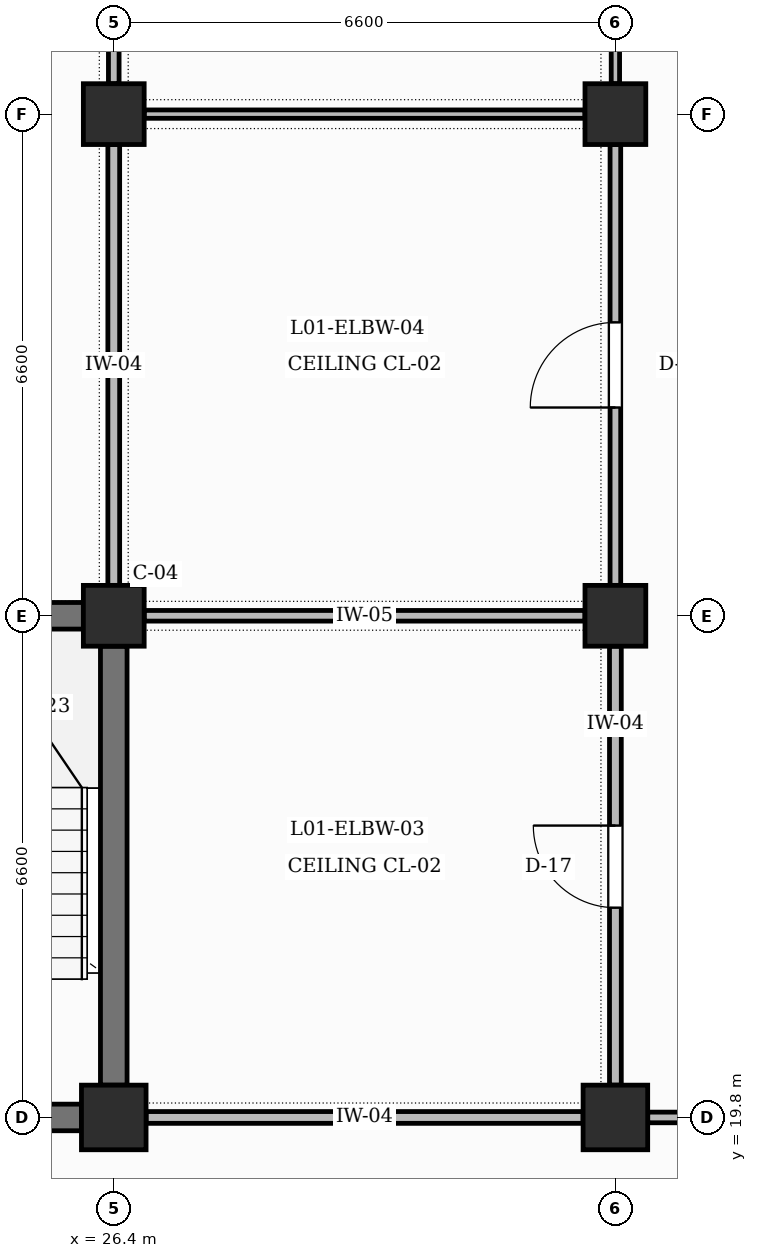
"""IFC4 building model, lengths in metres.
Left out: names, types, materials, properties, quantities, classifications, styles, units other than length and angle.
Written with IfcOpenShell. Run it as: python <this file> out.ifc"""

import sys

from ifc_helpers import new_model, si_unit, direction, frame, frame_2d, origin, origin_2d, place, context, subcontext, project, spatial, rectangle, extrude, element, fill, save


model = new_model("IFC4")
c1 = context("Model", 3, precision=1e-05, world=origin(), true_north=direction((0.0, 1.0)))
c2 = subcontext(c1, "Body", "Model", "MODEL_VIEW")
j1 = project(units=[si_unit("LENGTHUNIT", "METRE"), si_unit("PLANEANGLEUNIT", "RADIAN")], contexts=[c1])
p1 = place(None, origin())
s1 = spatial("IfcSite", under=j1, at=p1, CompositionType="ELEMENT")
p2 = place(p1, origin())
s2 = spatial("IfcBuilding", under=s1, at=p2, CompositionType="ELEMENT")
p3 = place(p2, frame((0.0, 0.0, 5.4)))
s3 = spatial("IfcBuildingStorey", under=s2, at=p3, CompositionType="ELEMENT", Elevation=5.4)
p4 = place(p3, frame((26.4, 19.8, 0.0), z_axis=(0.0, 0.0, 1.0), x_axis=(1.0, 0.0, 0.0)))
e1 = element("IfcColumn", 1, at=p4, inside=s3, PredefinedType="COLUMN", context=c2, shape_type="SweptSolid", body=[
    extrude(rectangle(XDim=0.85, YDim=0.85, at=origin_2d()), origin(), (0.0, 0.0, 1.0), 4.8),
])
for number, where, z_axis, x_axis in (
    (2, (26.4, 26.4, 0.0), (0.0, 0.0, 1.0), (1.0, 0.0, 0.0)),
    (3, (26.4, 33.0, 0.0), (0.0, 0.0, 1.0), (1.0, 0.0, 0.0)),
):
    element("IfcColumn", number, at=place(p3, frame(where, z_axis=z_axis, x_axis=x_axis)), inside=s3, PredefinedType="COLUMN", context=c2, shape_type="SweptSolid", body=[
        extrude(rectangle(XDim=0.8, YDim=0.8, at=origin_2d()), origin(), (0.0, 0.0, 1.0), 4.8),
    ])
p5 = place(p3, frame((33.0, 19.8, 0.0), z_axis=(0.0, 0.0, 1.0), x_axis=(1.0, 0.0, 0.0)))
e4 = element("IfcColumn", 4, at=p5, inside=s3, PredefinedType="COLUMN", context=c2, shape_type="SweptSolid", body=[
    extrude(rectangle(XDim=0.85, YDim=0.85, at=origin_2d()), origin(), (0.0, 0.0, 1.0), 4.8),
])
for number, where, z_axis, x_axis in (
    (5, (33.0, 26.4, 0.0), (0.0, 0.0, 1.0), (1.0, 0.0, 0.0)),
    (6, (33.0, 33.0, 0.0), (0.0, 0.0, 1.0), (1.0, 0.0, 0.0)),
):
    element("IfcColumn", number, at=place(p3, frame(where, z_axis=z_axis, x_axis=x_axis)), inside=s3, PredefinedType="COLUMN", context=c2, shape_type="SweptSolid", body=[
        extrude(rectangle(XDim=0.8, YDim=0.8, at=origin_2d()), origin(), (0.0, 0.0, 1.0), 4.8),
    ])
p6 = place(p3, frame((20.225, 19.8, 0.0), z_axis=(0.0, 0.0, 1.0), x_axis=(1.0, 0.0, 0.0)))
e7 = element("IfcWall", 7, at=p6, inside=s3, PredefinedType="SHEAR", context=c2, shape_type="SweptSolid", body=[
    extrude(rectangle(XDim=5.75, YDim=0.35, at=frame_2d((2.875, 0.0))), origin(), (0.0, 0.0, 1.0), 3.6),
])
p7 = place(p6, frame((2.325, 0.0, 0.0)))
e8 = element("IfcOpeningElement", 8, at=p7, cuts=e7, PredefinedType="OPENING", context=c2, shape_type="SweptSolid", body=[
    extrude(rectangle(XDim=1.1, YDim=2.15, at=frame_2d((0.55, 1.075))), frame((0.0, 0.185, 0.0), z_axis=(0.0, -1.0, 0.0), x_axis=(1.0, 0.0, 0.0)), (0.0, 0.0, 1.0), 0.37),
])
for number, where, z_axis, x_axis in (
    (9, (20.225, 26.4, 0.0), (0.0, 0.0, 1.0), (1.0, 0.0, 0.0)),
    (10, (26.4, 20.225, 0.0), (0.0, 0.0, 1.0), (0.0, 1.0, 0.0)),
):
    element("IfcWall", number, at=place(p3, frame(where, z_axis=z_axis, x_axis=x_axis)), inside=s3, PredefinedType="SHEAR", context=c2, shape_type="SweptSolid", body=[
        extrude(rectangle(XDim=5.775, YDim=0.35, at=frame_2d((2.887, 0.0))), origin(), (0.0, 0.0, 1.0), 3.7),
    ])
p8 = place(p3, frame((26.4, 26.8, 0.0), z_axis=(0.0, 0.0, 1.0), x_axis=(0.0, 1.0, 0.0)))
e11 = element("IfcWall", 11, at=p8, inside=s3, PredefinedType="PARTITIONING", context=c2, shape_type="SweptSolid", body=[
    extrude(rectangle(XDim=5.8, YDim=0.155, at=frame_2d((2.9, 0.0))), origin(), (0.0, 0.0, 1.0), 3.7),
])
p9 = place(p3, frame((26.4, 33.4, 0.0), z_axis=(0.0, 0.0, 1.0), x_axis=(0.0, 1.0, 0.0)))
e12 = element("IfcWall", 12, at=p9, inside=s3, PredefinedType="PARTITIONING", context=c2, shape_type="SweptSolid", body=[
    extrude(rectangle(XDim=5.8, YDim=0.14, at=frame_2d((2.9, 0.0))), origin(), (0.0, 0.0, 1.0), 3.7),
])
p10 = place(p3, frame((26.825, 19.8, 0.0), z_axis=(0.0, 0.0, 1.0), x_axis=(1.0, 0.0, 0.0)))
e13 = element("IfcWall", 13, at=p10, inside=s3, PredefinedType="PARTITIONING", context=c2, shape_type="SweptSolid", body=[
    extrude(rectangle(XDim=5.75, YDim=0.155, at=frame_2d((2.875, 0.0))), origin(), (0.0, 0.0, 1.0), 3.7),
])
p11 = place(p3, frame((33.0, 20.225, 0.0), z_axis=(0.0, 0.0, 1.0), x_axis=(0.0, 1.0, 0.0)))
e14 = element("IfcWall", 14, at=p11, inside=s3, PredefinedType="PARTITIONING", context=c2, shape_type="SweptSolid", body=[
    extrude(rectangle(XDim=5.775, YDim=0.155, at=frame_2d((2.887, 0.0))), origin(), (0.0, 0.0, 1.0), 3.7),
])
p12 = place(p11, frame((2.335, 0.0, 0.0)))
e15 = element("IfcOpeningElement", 15, at=p12, cuts=e14, PredefinedType="OPENING", context=c2, shape_type="SweptSolid", body=[
    extrude(rectangle(XDim=1.08, YDim=2.15, at=frame_2d((0.54, 1.075))), frame((0.0, 0.087, 0.0), z_axis=(0.0, -1.0, 0.0), x_axis=(1.0, 0.0, 0.0)), (0.0, 0.0, 1.0), 0.175),
])
p13 = place(p3, frame((26.8, 26.4, 0.0), z_axis=(0.0, 0.0, 1.0), x_axis=(1.0, 0.0, 0.0)))
e16 = element("IfcWall", 16, at=p13, inside=s3, PredefinedType="PARTITIONING", context=c2, shape_type="SweptSolid", body=[
    extrude(rectangle(XDim=5.8, YDim=0.14, at=frame_2d((2.9, 0.0))), origin(), (0.0, 0.0, 1.0), 3.6),
])
p14 = place(p3, frame((33.0, 26.8, 0.0), z_axis=(0.0, 0.0, 1.0), x_axis=(0.0, 1.0, 0.0)))
e17 = element("IfcWall", 17, at=p14, inside=s3, PredefinedType="PARTITIONING", context=c2, shape_type="SweptSolid", body=[
    extrude(rectangle(XDim=5.8, YDim=0.14, at=frame_2d((2.9, 0.0))), origin(), (0.0, 0.0, 1.0), 3.7),
])
p15 = place(p14, frame((2.34, 0.0, 0.0)))
e18 = element("IfcOpeningElement", 18, at=p15, cuts=e17, PredefinedType="OPENING", context=c2, shape_type="SweptSolid", body=[
    extrude(rectangle(XDim=1.12, YDim=2.2, at=frame_2d((0.56, 1.1))), frame((0.0, 0.08, 0.0), z_axis=(0.0, -1.0, 0.0), x_axis=(1.0, 0.0, 0.0)), (0.0, 0.0, 1.0), 0.16),
])
p16 = place(p3, frame((26.8, 33.0, 0.0), z_axis=(0.0, 0.0, 1.0), x_axis=(1.0, 0.0, 0.0)))
e19 = element("IfcWall", 19, at=p16, inside=s3, PredefinedType="PARTITIONING", context=c2, shape_type="SweptSolid", body=[
    extrude(rectangle(XDim=5.8, YDim=0.11, at=frame_2d((2.9, 0.0))), origin(), (0.0, 0.0, 1.0), 3.7),
])
p17 = place(p3, frame((33.0, 33.4, 0.0), z_axis=(0.0, 0.0, 1.0), x_axis=(0.0, 1.0, 0.0)))
e20 = element("IfcWall", 20, at=p17, inside=s3, PredefinedType="PARTITIONING", context=c2, shape_type="SweptSolid", body=[
    extrude(rectangle(XDim=5.8, YDim=0.11, at=frame_2d((2.9, 0.0))), origin(), (0.0, 0.0, 1.0), 3.7),
])
p18 = place(p17, frame((2.31, 0.0, 0.0)))
e21 = element("IfcOpeningElement", 21, at=p18, cuts=e20, PredefinedType="OPENING", context=c2, shape_type="SweptSolid", body=[
    extrude(rectangle(XDim=1.18, YDim=2.2, at=frame_2d((0.59, 1.1))), frame((0.0, 0.065, 0.0), z_axis=(0.0, -1.0, 0.0), x_axis=(1.0, 0.0, 0.0)), (0.0, 0.0, 1.0), 0.13),
])
p19 = place(p3, frame((33.425, 19.8, 0.0), z_axis=(0.0, 0.0, 1.0), x_axis=(1.0, 0.0, 0.0)))
e22 = element("IfcWall", 22, at=p19, inside=s3, PredefinedType="PARTITIONING", context=c2, shape_type="SweptSolid", body=[
    extrude(rectangle(XDim=5.775, YDim=0.14, at=frame_2d((2.887, 0.0))), origin(), (0.0, 0.0, 1.0), 3.6),
])
p20 = place(p19, frame((2.025, 0.0, 0.0)))
e23 = element("IfcOpeningElement", 23, at=p20, cuts=e22, PredefinedType="OPENING", context=c2, shape_type="SweptSolid", body=[
    extrude(rectangle(XDim=1.7, YDim=2.25, at=frame_2d((0.85, 1.125))), frame((0.0, 0.08, 0.0), z_axis=(0.0, -1.0, 0.0), x_axis=(1.0, 0.0, 0.0)), (0.0, 0.0, 1.0), 0.16),
])
p21 = place(p12, origin())
e24 = element("IfcDoor", 24, at=p21, inside=s3, OperationType="SINGLE_SWING_RIGHT", PredefinedType="DOOR", context=c2, shape_type="SweptSolid", body=[
    extrude(rectangle(XDim=1.08, YDim=2.15, at=frame_2d((0.54, 1.075))), frame((0.0, 0.025, 0.0), z_axis=(0.0, -1.0, 0.0), x_axis=(1.0, 0.0, 0.0)), (0.0, 0.0, 1.0), 0.05),
])
fill(e15, e24)
p22 = place(p15, origin())
e25 = element("IfcDoor", 25, at=p22, inside=s3, OperationType="SINGLE_SWING_LEFT", PredefinedType="DOOR", context=c2, shape_type="SweptSolid", body=[
    extrude(rectangle(XDim=1.12, YDim=2.2, at=frame_2d((0.56, 1.1))), frame((0.0, 0.025, 0.0), z_axis=(0.0, -1.0, 0.0), x_axis=(1.0, 0.0, 0.0)), (0.0, 0.0, 1.0), 0.05),
])
fill(e18, e25)
save(model, sys.argv[1])
